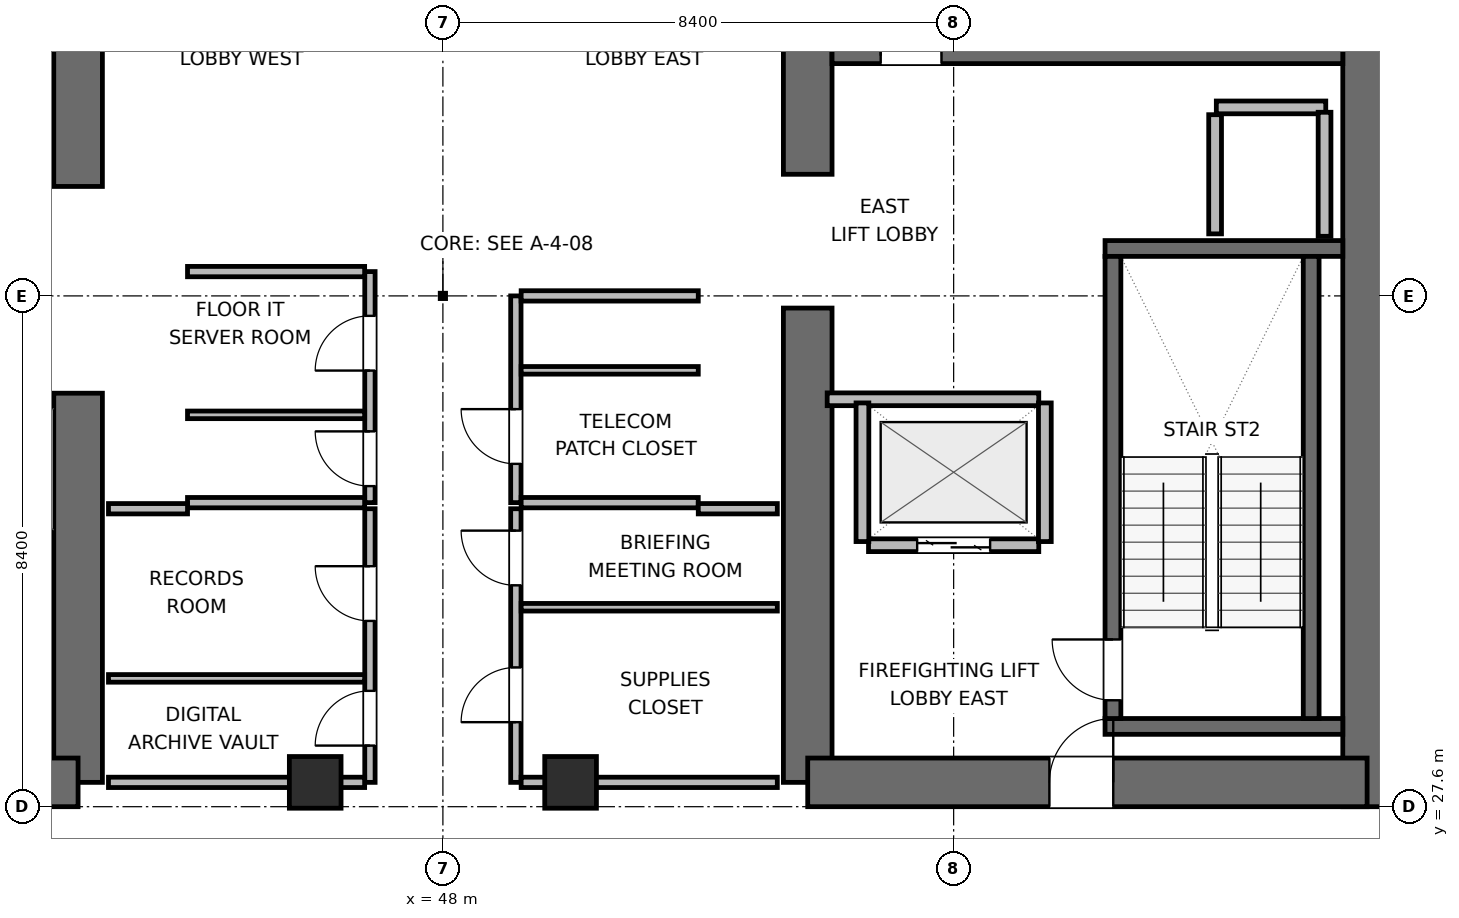
"""IFC4 building model, lengths in metres.
Left out: names, types, materials, properties, quantities, classifications, styles, units other than length and angle.
Written with IfcOpenShell. Run it as: python <this file> out.ifc"""

import sys

from ifc_helpers import new_model, si_unit, direction, frame, frame_2d, origin, origin_2d, place, context, subcontext, project, spatial, rectangle, extrude, element, fill, save


model = new_model("IFC4")
c1 = context("Model", 3, precision=1e-05, world=origin(), true_north=direction((0.0, 1.0)))
c2 = subcontext(c1, "Body", "Model", "MODEL_VIEW")
j1 = project(units=[si_unit("LENGTHUNIT", "METRE"), si_unit("PLANEANGLEUNIT", "RADIAN")], contexts=[c1])
p1 = place(None, origin())
s1 = spatial("IfcSite", under=j1, at=p1, CompositionType="ELEMENT")
p2 = place(p1, origin())
s2 = spatial("IfcBuilding", under=s1, at=p2, CompositionType="ELEMENT")
p3 = place(p2, frame((0.0, 0.0, 166.2)))
s3 = spatial("IfcBuildingStorey", under=s2, at=p3, CompositionType="ELEMENT", Elevation=166.2)
p4 = place(p3, frame((42.0, 28.0, 0.0), z_axis=(0.0, 0.0, 1.0), x_axis=(0.0, 1.0, 0.0)))
e1 = element("IfcWall", 1, at=p4, inside=s3, PredefinedType="SHEAR", context=c2, shape_type="SweptSolid", body=[
    extrude(rectangle(XDim=6.4, YDim=0.8, at=frame_2d((3.2, 0.0))), origin(), (0.0, 0.0, 1.0), 3.9),
])
p5 = place(p3, frame((42.0, 37.8, 0.0), z_axis=(0.0, 0.0, 1.0), x_axis=(0.0, 1.0, 0.0)))
e2 = element("IfcWall", 2, at=p5, inside=s3, PredefinedType="SHEAR", context=c2, shape_type="SweptSolid", body=[
    extrude(rectangle(XDim=6.2, YDim=0.8, at=frame_2d((3.1, 0.0))), origin(), (0.0, 0.0, 1.0), 3.9),
])
p6 = place(p3, frame((32.8, 28.0, 0.0), z_axis=(0.0, 0.0, 1.0), x_axis=(1.0, 0.0, 0.0)))
e3 = element("IfcWall", 3, at=p6, inside=s3, PredefinedType="SHEAR", context=c2, shape_type="SweptSolid", body=[
    extrude(rectangle(XDim=9.2, YDim=0.8, at=frame_2d((4.6, 0.0))), origin(), (0.0, 0.0, 1.0), 3.9),
])
p7 = place(p6, frame((5.025, 0.0, 0.0)))
e4 = element("IfcOpeningElement", 4, at=p7, cuts=e3, PredefinedType="OPENING", context=c2, shape_type="SweptSolid", body=[
    extrude(rectangle(XDim=1.05, YDim=2.04, at=frame_2d((0.525, 1.02))), frame((0.0, 0.41, 0.0), z_axis=(0.0, -1.0, 0.0), x_axis=(1.0, 0.0, 0.0)), (0.0, 0.0, 1.0), 0.82),
])
p8 = place(p3, frame((54.0, 28.0, 0.0), z_axis=(0.0, 0.0, 1.0), x_axis=(0.0, 1.0, 0.0)))
e5 = element("IfcWall", 5, at=p8, inside=s3, PredefinedType="SHEAR", context=c2, shape_type="SweptSolid", body=[
    extrude(rectangle(XDim=7.8, YDim=0.8, at=frame_2d((3.9, 0.0))), origin(), (0.0, 0.0, 1.0), 3.9),
])
p9 = place(p3, frame((54.0, 38.0, 0.0), z_axis=(0.0, 0.0, 1.0), x_axis=(0.0, 1.0, 0.0)))
e6 = element("IfcWall", 6, at=p9, inside=s3, PredefinedType="SHEAR", context=c2, shape_type="SweptSolid", body=[
    extrude(rectangle(XDim=6.0, YDim=0.8, at=frame_2d((3.0, 0.0))), origin(), (0.0, 0.0, 1.0), 3.9),
])
p10 = place(p3, frame((63.2, 27.6, 0.0), z_axis=(0.0, 0.0, 1.0), x_axis=(0.0, 1.0, 0.0)))
e7 = element("IfcWall", 7, at=p10, inside=s3, PredefinedType="SHEAR", context=c2, shape_type="SweptSolid", body=[
    extrude(rectangle(XDim=16.8, YDim=0.8, at=frame_2d((8.4, 0.0))), origin(), (0.0, 0.0, 1.0), 3.9),
])
p11 = place(p3, frame((54.0, 28.0, 0.0), z_axis=(0.0, 0.0, 1.0), x_axis=(1.0, 0.0, 0.0)))
e8 = element("IfcWall", 8, at=p11, inside=s3, PredefinedType="SHEAR", context=c2, shape_type="SweptSolid", body=[
    extrude(rectangle(XDim=9.2, YDim=0.8, at=frame_2d((4.6, 0.0))), origin(), (0.0, 0.0, 1.0), 3.9),
])
p12 = place(p11, frame((3.975, 0.0, 0.0)))
e9 = element("IfcOpeningElement", 9, at=p12, cuts=e8, PredefinedType="OPENING", context=c2, shape_type="SweptSolid", body=[
    extrude(rectangle(XDim=1.05, YDim=2.04, at=frame_2d((0.525, 1.02))), frame((0.0, 0.41, 0.0), z_axis=(0.0, -1.0, 0.0), x_axis=(1.0, 0.0, 0.0)), (0.0, 0.0, 1.0), 0.82),
])
for number, where, z_axis, x_axis in (
    (10, (58.89, 28.92, 0.0), (0.0, 0.0, 1.0), (1.0, 0.0, 0.0)),
    (11, (58.89, 36.78, 0.0), (0.0, 0.0, 1.0), (1.0, 0.0, 0.0)),
):
    element("IfcWall", number, at=place(p3, frame(where, z_axis=z_axis, x_axis=x_axis)), inside=s3, PredefinedType="SHEAR", context=c2, shape_type="SweptSolid", body=[
        extrude(rectangle(XDim=3.91, YDim=0.26, at=frame_2d((1.955, 0.0))), origin(), (0.0, 0.0, 1.0), 3.9),
    ])
p13 = place(p3, frame((59.02, 29.05, 0.0), z_axis=(0.0, 0.0, 1.0), x_axis=(0.0, 1.0, 0.0)))
e12 = element("IfcWall", 12, at=p13, inside=s3, PredefinedType="SHEAR", context=c2, shape_type="SweptSolid", body=[
    extrude(rectangle(XDim=7.6, YDim=0.26, at=frame_2d((3.8, 0.0))), origin(), (0.0, 0.0, 1.0), 3.9),
])
p14 = place(p13, frame((0.3, 0.0, 0.0)))
e13 = element("IfcOpeningElement", 13, at=p14, cuts=e12, PredefinedType="OPENING", context=c2, shape_type="SweptSolid", body=[
    extrude(rectangle(XDim=1.0, YDim=2.04, at=frame_2d((0.5, 1.02))), frame((0.0, 0.14, 0.0), z_axis=(0.0, -1.0, 0.0), x_axis=(1.0, 0.0, 0.0)), (0.0, 0.0, 1.0), 0.28),
])
p15 = place(p3, frame((62.28, 29.05, 0.0), z_axis=(0.0, 0.0, 1.0), x_axis=(0.0, 1.0, 0.0)))
e14 = element("IfcWall", 14, at=p15, inside=s3, PredefinedType="SHEAR", context=c2, shape_type="SweptSolid", body=[
    extrude(rectangle(XDim=7.6, YDim=0.26, at=frame_2d((3.8, 0.0))), origin(), (0.0, 0.0, 1.0), 3.9),
])
p16 = place(p3, frame((54.4, 39.95, 0.0), z_axis=(0.0, 0.0, 1.0), x_axis=(1.0, 0.0, 0.0)))
e15 = element("IfcWall", 15, at=p16, inside=s3, PredefinedType="SHEAR", context=c2, shape_type="SweptSolid", body=[
    extrude(rectangle(XDim=8.4, YDim=0.26, at=frame_2d((4.2, 0.0))), origin(), (0.0, 0.0, 1.0), 3.9),
])
p17 = place(p16, frame((0.8, 0.0, 0.0)))
e16 = element("IfcOpeningElement", 16, at=p17, cuts=e15, PredefinedType="OPENING", context=c2, shape_type="SweptSolid", body=[
    extrude(rectangle(XDim=1.0, YDim=2.04, at=frame_2d((0.5, 1.02))), frame((0.0, 0.14, 0.0), z_axis=(0.0, -1.0, 0.0), x_axis=(1.0, 0.0, 0.0)), (0.0, 0.0, 1.0), 0.28),
])
for number, where, z_axis, x_axis in (
    (17, (45.9, 28.0, 0.0), (0.0, 0.0, 1.0), (1.0, 0.0, 0.0)),
    (18, (50.1, 28.0, 0.0), (0.0, 0.0, 1.0), (1.0, 0.0, 0.0)),
):
    element("IfcColumn", number, at=place(p3, frame(where, z_axis=z_axis, x_axis=x_axis)), inside=s3, PredefinedType="COLUMN", context=c2, shape_type="SweptSolid", body=[
        extrude(rectangle(XDim=0.85, YDim=0.85, at=origin_2d()), origin(), (0.0, 0.0, 1.0), 3.9),
    ])
p18 = place(p3, frame((60.72, 39.1, 0.0), z_axis=(0.0, 0.0, 1.0), x_axis=(1.0, 0.0, 0.0)))
e19 = element("IfcWall", 19, at=p18, inside=s3, PredefinedType="PARTITIONING", context=c2, shape_type="SweptSolid", body=[
    extrude(rectangle(XDim=1.8, YDim=0.21, at=frame_2d((0.9, 0.0))), origin(), (0.0, 0.0, 1.0), 3.68),
])
p19 = place(p3, frame((60.7, 37.02, 0.0), z_axis=(0.0, 0.0, 1.0), x_axis=(0.0, 1.0, 0.0)))
e20 = element("IfcWall", 20, at=p19, inside=s3, PredefinedType="PARTITIONING", context=c2, shape_type="SweptSolid", body=[
    extrude(rectangle(XDim=1.96, YDim=0.21, at=frame_2d((0.98, 0.0))), origin(), (0.0, 0.0, 1.0), 3.68),
])
p20 = place(p3, frame((62.5, 36.98, 0.0), z_axis=(0.0, 0.0, 1.0), x_axis=(0.0, 1.0, 0.0)))
e21 = element("IfcWall", 21, at=p20, inside=s3, PredefinedType="PARTITIONING", context=c2, shape_type="SweptSolid", body=[
    extrude(rectangle(XDim=2.04, YDim=0.21, at=frame_2d((1.02, 0.0))), origin(), (0.0, 0.0, 1.0), 3.68),
])
p21 = place(p3, frame((55.0, 31.9, 0.0), z_axis=(0.0, 0.0, 1.0), x_axis=(1.0, 0.0, 0.0)))
e22 = element("IfcWall", 22, at=p21, inside=s3, PredefinedType="PARTITIONING", context=c2, shape_type="SweptSolid", body=[
    extrude(rectangle(XDim=2.8, YDim=0.21, at=frame_2d((1.4, 0.0))), origin(), (0.0, 0.0, 1.0), 3.68),
])
p22 = place(p21, frame((0.8, 0.0, 0.0)))
e23 = element("IfcOpeningElement", 23, at=p22, cuts=e22, PredefinedType="OPENING", context=c2, shape_type="SweptSolid", body=[
    extrude(rectangle(XDim=1.2, YDim=2.04, at=frame_2d((0.6, 1.02))), frame((0.0, 0.115, 0.0), z_axis=(0.0, -1.0, 0.0), x_axis=(1.0, 0.0, 0.0)), (0.0, 0.0, 1.0), 0.23),
])
p23 = place(p3, frame((54.32, 34.3, 0.0), z_axis=(0.0, 0.0, 1.0), x_axis=(1.0, 0.0, 0.0)))
e24 = element("IfcWall", 24, at=p23, inside=s3, PredefinedType="PARTITIONING", context=c2, shape_type="SweptSolid", body=[
    extrude(rectangle(XDim=3.48, YDim=0.21, at=frame_2d((1.74, 0.0))), origin(), (0.0, 0.0, 1.0), 3.68),
])
for number, where, z_axis, x_axis in (
    (25, (54.9, 31.96, 0.0), (0.0, 0.0, 1.0), (0.0, 1.0, 0.0)),
    (26, (57.9, 31.96, 0.0), (0.0, 0.0, 1.0), (0.0, 1.0, 0.0)),
):
    element("IfcWall", number, at=place(p3, frame(where, z_axis=z_axis, x_axis=x_axis)), inside=s3, PredefinedType="PARTITIONING", context=c2, shape_type="SweptSolid", body=[
        extrude(rectangle(XDim=2.28, YDim=0.21, at=frame_2d((1.14, 0.0))), origin(), (0.0, 0.0, 1.0), 3.68),
    ])
p24 = place(p3, frame((46.8, 32.6, 0.0), z_axis=(0.0, 0.0, 1.0), x_axis=(0.0, 1.0, 0.0)))
e27 = element("IfcWall", 27, at=p24, inside=s3, PredefinedType="PARTITIONING", context=c2, shape_type="SweptSolid", body=[
    extrude(rectangle(XDim=3.8, YDim=0.17, at=frame_2d((1.9, 0.0))), origin(), (0.0, 0.0, 1.0), 3.68),
])
p25 = place(p24, frame((0.272, 0.0, 0.0)))
e28 = element("IfcOpeningElement", 28, at=p25, cuts=e27, PredefinedType="OPENING", context=c2, shape_type="SweptSolid", body=[
    extrude(rectangle(XDim=0.9, YDim=2.02, at=frame_2d((0.45, 1.01))), frame((0.0, 0.095, 0.0), z_axis=(0.0, -1.0, 0.0), x_axis=(1.0, 0.0, 0.0)), (0.0, 0.0, 1.0), 0.19),
])
p26 = place(p24, frame((2.172, 0.0, 0.0)))
e29 = element("IfcOpeningElement", 29, at=p26, cuts=e27, PredefinedType="OPENING", context=c2, shape_type="SweptSolid", body=[
    extrude(rectangle(XDim=0.9, YDim=2.02, at=frame_2d((0.45, 1.01))), frame((0.0, 0.095, 0.0), z_axis=(0.0, -1.0, 0.0), x_axis=(1.0, 0.0, 0.0)), (0.0, 0.0, 1.0), 0.19),
])
for number, where, z_axis, x_axis in (
    (30, (43.8, 32.6, 0.0), (0.0, 0.0, 1.0), (1.0, 0.0, 0.0)),
    (31, (43.8, 36.4, 0.0), (0.0, 0.0, 1.0), (1.0, 0.0, 0.0)),
):
    element("IfcWall", number, at=place(p3, frame(where, z_axis=z_axis, x_axis=x_axis)), inside=s3, PredefinedType="PARTITIONING", context=c2, shape_type="SweptSolid", body=[
        extrude(rectangle(XDim=2.913, YDim=0.17, at=frame_2d((1.457, 0.0))), origin(), (0.0, 0.0, 1.0), 3.68),
    ])
p27 = place(p3, frame((43.8, 34.044, 0.0), z_axis=(0.0, 0.0, 1.0), x_axis=(1.0, 0.0, 0.0)))
e32 = element("IfcWall", 32, at=p27, inside=s3, PredefinedType="PARTITIONING", context=c2, shape_type="SweptSolid", body=[
    extrude(rectangle(XDim=2.913, YDim=0.125, at=frame_2d((1.457, 0.0))), origin(), (0.0, 0.0, 1.0), 3.68),
])
p28 = place(p3, frame((49.2, 32.6, 0.0), z_axis=(0.0, 0.0, 1.0), x_axis=(0.0, 1.0, 0.0)))
e33 = element("IfcWall", 33, at=p28, inside=s3, PredefinedType="PARTITIONING", context=c2, shape_type="SweptSolid", body=[
    extrude(rectangle(XDim=3.4, YDim=0.17, at=frame_2d((1.7, 0.0))), origin(), (0.0, 0.0, 1.0), 3.68),
])
p29 = place(p28, frame((0.638, 0.0, 0.0)))
e34 = element("IfcOpeningElement", 34, at=p29, cuts=e33, PredefinedType="OPENING", context=c2, shape_type="SweptSolid", body=[
    extrude(rectangle(XDim=0.9, YDim=2.02, at=frame_2d((0.45, 1.01))), frame((0.0, 0.095, 0.0), z_axis=(0.0, -1.0, 0.0), x_axis=(1.0, 0.0, 0.0)), (0.0, 0.0, 1.0), 0.19),
])
for number, where, z_axis, x_axis in (
    (35, (49.287, 32.6, 0.0), (0.0, 0.0, 1.0), (1.0, 0.0, 0.0)),
    (36, (49.287, 36.0, 0.0), (0.0, 0.0, 1.0), (1.0, 0.0, 0.0)),
):
    element("IfcWall", number, at=place(p3, frame(where, z_axis=z_axis, x_axis=x_axis)), inside=s3, PredefinedType="PARTITIONING", context=c2, shape_type="SweptSolid", body=[
        extrude(rectangle(XDim=2.913, YDim=0.17, at=frame_2d((1.457, 0.0))), origin(), (0.0, 0.0, 1.0), 3.68),
    ])
p30 = place(p3, frame((49.287, 34.776, 0.0), z_axis=(0.0, 0.0, 1.0), x_axis=(1.0, 0.0, 0.0)))
e37 = element("IfcWall", 37, at=p30, inside=s3, PredefinedType="PARTITIONING", context=c2, shape_type="SweptSolid", body=[
    extrude(rectangle(XDim=2.913, YDim=0.125, at=frame_2d((1.457, 0.0))), origin(), (0.0, 0.0, 1.0), 3.68),
])
p31 = place(p3, frame((46.8, 28.0, 0.0), z_axis=(0.0, 0.0, 1.0), x_axis=(0.0, 1.0, 0.0)))
e38 = element("IfcWall", 38, at=p31, inside=s3, PredefinedType="PARTITIONING", context=c2, shape_type="SweptSolid", body=[
    extrude(rectangle(XDim=4.5, YDim=0.17, at=frame_2d((2.25, 0.0))), origin(), (0.0, 0.0, 1.0), 3.68),
])
p32 = place(p31, frame((0.605, 0.0, 0.0)))
e39 = element("IfcOpeningElement", 39, at=p32, cuts=e38, PredefinedType="OPENING", context=c2, shape_type="SweptSolid", body=[
    extrude(rectangle(XDim=0.9, YDim=2.02, at=frame_2d((0.45, 1.01))), frame((0.0, 0.095, 0.0), z_axis=(0.0, -1.0, 0.0), x_axis=(1.0, 0.0, 0.0)), (0.0, 0.0, 1.0), 0.19),
])
p33 = place(p31, frame((2.655, 0.0, 0.0)))
e40 = element("IfcOpeningElement", 40, at=p33, cuts=e38, PredefinedType="OPENING", context=c2, shape_type="SweptSolid", body=[
    extrude(rectangle(XDim=0.9, YDim=2.02, at=frame_2d((0.45, 1.01))), frame((0.0, 0.095, 0.0), z_axis=(0.0, -1.0, 0.0), x_axis=(1.0, 0.0, 0.0)), (0.0, 0.0, 1.0), 0.19),
])
p34 = place(p3, frame((42.5, 28.0, 0.0), z_axis=(0.0, 0.0, 1.0), x_axis=(1.0, 0.0, 0.0)))
e41 = element("IfcWall", 41, at=p34, inside=s3, PredefinedType="PARTITIONING", context=c2, shape_type="SweptSolid", body=[
    extrude(rectangle(XDim=4.213, YDim=0.17, at=frame_2d((2.106, 0.0))), origin(), (0.0, 0.0, 1.0), 2.765),
])
p35 = place(p3, frame((42.5, 32.5, 0.0), z_axis=(0.0, 0.0, 1.0), x_axis=(1.0, 0.0, 0.0)))
e42 = element("IfcWall", 42, at=p35, inside=s3, PredefinedType="PARTITIONING", context=c2, shape_type="SweptSolid", body=[
    extrude(rectangle(XDim=1.3, YDim=0.17, at=frame_2d((0.65, 0.0))), origin(), (0.0, 0.0, 1.0), 3.68),
])
p36 = place(p3, frame((42.5, 29.71, 0.0), z_axis=(0.0, 0.0, 1.0), x_axis=(1.0, 0.0, 0.0)))
e43 = element("IfcWall", 43, at=p36, inside=s3, PredefinedType="PARTITIONING", context=c2, shape_type="SweptSolid", body=[
    extrude(rectangle(XDim=4.213, YDim=0.125, at=frame_2d((2.106, 0.0))), origin(), (0.0, 0.0, 1.0), 3.68),
])
p37 = place(p3, frame((49.2, 28.0, 0.0), z_axis=(0.0, 0.0, 1.0), x_axis=(0.0, 1.0, 0.0)))
e44 = element("IfcWall", 44, at=p37, inside=s3, PredefinedType="PARTITIONING", context=c2, shape_type="SweptSolid", body=[
    extrude(rectangle(XDim=4.5, YDim=0.17, at=frame_2d((2.25, 0.0))), origin(), (0.0, 0.0, 1.0), 3.68),
])
p38 = place(p37, frame((0.99, 0.0, 0.0)))
e45 = element("IfcOpeningElement", 45, at=p38, cuts=e44, PredefinedType="OPENING", context=c2, shape_type="SweptSolid", body=[
    extrude(rectangle(XDim=0.9, YDim=2.02, at=frame_2d((0.45, 1.01))), frame((0.0, 0.095, 0.0), z_axis=(0.0, -1.0, 0.0), x_axis=(1.0, 0.0, 0.0)), (0.0, 0.0, 1.0), 0.19),
])
p39 = place(p37, frame((3.24, 0.0, 0.0)))
e46 = element("IfcOpeningElement", 46, at=p39, cuts=e44, PredefinedType="OPENING", context=c2, shape_type="SweptSolid", body=[
    extrude(rectangle(XDim=0.9, YDim=2.02, at=frame_2d((0.45, 1.01))), frame((0.0, 0.095, 0.0), z_axis=(0.0, -1.0, 0.0), x_axis=(1.0, 0.0, 0.0)), (0.0, 0.0, 1.0), 0.19),
])
p40 = place(p3, frame((49.287, 28.0, 0.0), z_axis=(0.0, 0.0, 1.0), x_axis=(1.0, 0.0, 0.0)))
e47 = element("IfcWall", 47, at=p40, inside=s3, PredefinedType="PARTITIONING", context=c2, shape_type="SweptSolid", body=[
    extrude(rectangle(XDim=4.213, YDim=0.17, at=frame_2d((2.106, 0.0))), origin(), (0.0, 0.0, 1.0), 2.765),
])
p41 = place(p3, frame((52.2, 32.5, 0.0), z_axis=(0.0, 0.0, 1.0), x_axis=(1.0, 0.0, 0.0)))
e48 = element("IfcWall", 48, at=p41, inside=s3, PredefinedType="PARTITIONING", context=c2, shape_type="SweptSolid", body=[
    extrude(rectangle(XDim=1.3, YDim=0.17, at=frame_2d((0.65, 0.0))), origin(), (0.0, 0.0, 1.0), 3.68),
])
p42 = place(p3, frame((49.287, 30.88, 0.0), z_axis=(0.0, 0.0, 1.0), x_axis=(1.0, 0.0, 0.0)))
e49 = element("IfcWall", 49, at=p42, inside=s3, PredefinedType="PARTITIONING", context=c2, shape_type="SweptSolid", body=[
    extrude(rectangle(XDim=4.213, YDim=0.125, at=frame_2d((2.106, 0.0))), origin(), (0.0, 0.0, 1.0), 3.68),
])
p43 = place(p14, origin())
e50 = element("IfcDoor", 50, at=p43, inside=s3, OperationType="SINGLE_SWING_RIGHT", PredefinedType="DOOR", context=c2, shape_type="SweptSolid", body=[
    extrude(rectangle(XDim=1.0, YDim=2.04, at=frame_2d((0.5, 1.02))), frame((0.0, 0.025, 0.0), z_axis=(0.0, -1.0, 0.0), x_axis=(1.0, 0.0, 0.0)), (0.0, 0.0, 1.0), 0.05),
])
fill(e13, e50)
p44 = place(p17, origin())
e51 = element("IfcDoor", 51, at=p44, inside=s3, OperationType="SINGLE_SWING_LEFT", PredefinedType="DOOR", context=c2, shape_type="SweptSolid", body=[
    extrude(rectangle(XDim=1.0, YDim=2.04, at=frame_2d((0.5, 1.02))), frame((0.0, 0.025, 0.0), z_axis=(0.0, -1.0, 0.0), x_axis=(1.0, 0.0, 0.0)), (0.0, 0.0, 1.0), 0.05),
])
fill(e16, e51)
p45 = place(p22, origin())
e52 = element("IfcDoor", 52, at=p45, inside=s3, OperationType="DOUBLE_DOOR_SLIDING", PredefinedType="DOOR", context=c2, shape_type="SweptSolid", body=[
    extrude(rectangle(XDim=1.2, YDim=2.04, at=frame_2d((0.6, 1.02))), frame((0.0, 0.025, 0.0), z_axis=(0.0, -1.0, 0.0), x_axis=(1.0, 0.0, 0.0)), (0.0, 0.0, 1.0), 0.05),
])
fill(e23, e52)
p46 = place(p12, origin())
e53 = element("IfcDoor", 53, at=p46, inside=s3, OperationType="SINGLE_SWING_RIGHT", PredefinedType="DOOR", context=c2, shape_type="SweptSolid", body=[
    extrude(rectangle(XDim=1.05, YDim=2.04, at=frame_2d((0.525, 1.02))), frame((0.0, 0.025, 0.0), z_axis=(0.0, -1.0, 0.0), x_axis=(1.0, 0.0, 0.0)), (0.0, 0.0, 1.0), 0.05),
])
fill(e9, e53)
p47 = place(p25, origin())
e54 = element("IfcDoor", 54, at=p47, inside=s3, OperationType="SINGLE_SWING_RIGHT", PredefinedType="DOOR", context=c2, shape_type="SweptSolid", body=[
    extrude(rectangle(XDim=0.9, YDim=2.02, at=frame_2d((0.45, 1.01))), frame((0.0, 0.025, 0.0), z_axis=(0.0, -1.0, 0.0), x_axis=(1.0, 0.0, 0.0)), (0.0, 0.0, 1.0), 0.05),
])
fill(e28, e54)
p48 = place(p26, origin())
e55 = element("IfcDoor", 55, at=p48, inside=s3, OperationType="SINGLE_SWING_LEFT", PredefinedType="DOOR", context=c2, shape_type="SweptSolid", body=[
    extrude(rectangle(XDim=0.9, YDim=2.02, at=frame_2d((0.45, 1.01))), frame((0.0, 0.025, 0.0), z_axis=(0.0, -1.0, 0.0), x_axis=(1.0, 0.0, 0.0)), (0.0, 0.0, 1.0), 0.05),
])
fill(e29, e55)
p49 = place(p29, origin())
e56 = element("IfcDoor", 56, at=p49, inside=s3, OperationType="SINGLE_SWING_RIGHT", PredefinedType="DOOR", context=c2, shape_type="SweptSolid", body=[
    extrude(rectangle(XDim=0.9, YDim=2.02, at=frame_2d((0.45, 1.01))), frame((0.0, 0.025, 0.0), z_axis=(0.0, -1.0, 0.0), x_axis=(1.0, 0.0, 0.0)), (0.0, 0.0, 1.0), 0.05),
])
fill(e34, e56)
p50 = place(p32, origin())
e57 = element("IfcDoor", 57, at=p50, inside=s3, OperationType="SINGLE_SWING_LEFT", PredefinedType="DOOR", context=c2, shape_type="SweptSolid", body=[
    extrude(rectangle(XDim=0.9, YDim=2.02, at=frame_2d((0.45, 1.01))), frame((0.0, 0.025, 0.0), z_axis=(0.0, -1.0, 0.0), x_axis=(1.0, 0.0, 0.0)), (0.0, 0.0, 1.0), 0.05),
])
fill(e39, e57)
p51 = place(p33, origin())
e58 = element("IfcDoor", 58, at=p51, inside=s3, OperationType="SINGLE_SWING_RIGHT", PredefinedType="DOOR", context=c2, shape_type="SweptSolid", body=[
    extrude(rectangle(XDim=0.9, YDim=2.02, at=frame_2d((0.45, 1.01))), frame((0.0, 0.025, 0.0), z_axis=(0.0, -1.0, 0.0), x_axis=(1.0, 0.0, 0.0)), (0.0, 0.0, 1.0), 0.05),
])
fill(e40, e58)
p52 = place(p38, origin())
e59 = element("IfcDoor", 59, at=p52, inside=s3, OperationType="SINGLE_SWING_LEFT", PredefinedType="DOOR", context=c2, shape_type="SweptSolid", body=[
    extrude(rectangle(XDim=0.9, YDim=2.02, at=frame_2d((0.45, 1.01))), frame((0.0, 0.025, 0.0), z_axis=(0.0, -1.0, 0.0), x_axis=(1.0, 0.0, 0.0)), (0.0, 0.0, 1.0), 0.05),
])
fill(e45, e59)
p53 = place(p39, origin())
e60 = element("IfcDoor", 60, at=p53, inside=s3, OperationType="SINGLE_SWING_RIGHT", PredefinedType="DOOR", context=c2, shape_type="SweptSolid", body=[
    extrude(rectangle(XDim=0.9, YDim=2.02, at=frame_2d((0.45, 1.01))), frame((0.0, 0.025, 0.0), z_axis=(0.0, -1.0, 0.0), x_axis=(1.0, 0.0, 0.0)), (0.0, 0.0, 1.0), 0.05),
])
fill(e46, e60)
save(model, sys.argv[1])
